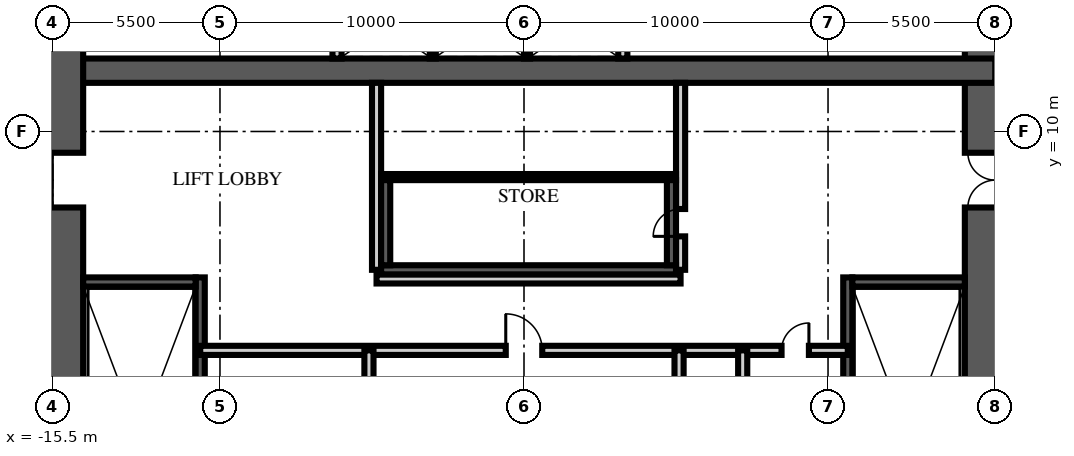
"""IFC4 building model, lengths in metres.
Left out: names, types, materials, properties, quantities, classifications, styles, units other than length and angle.
Written with IfcOpenShell. Run it as: python <this file> out.ifc"""

import sys

from ifc_helpers import new_model, si_unit, direction, frame, frame_2d, origin, place, context, subcontext, project, spatial, rectangle, extrude, element, fill, save


model = new_model("IFC4")
c1 = context("Model", 3, precision=1e-05, world=origin(), true_north=direction((0.0, 1.0)))
c2 = subcontext(c1, "Body", "Model", "MODEL_VIEW")
j1 = project(units=[si_unit("LENGTHUNIT", "METRE"), si_unit("PLANEANGLEUNIT", "RADIAN")], contexts=[c1])
p1 = place(None, origin())
s1 = spatial("IfcSite", under=j1, at=p1, CompositionType="ELEMENT")
p2 = place(p1, origin())
s2 = spatial("IfcBuilding", under=s1, at=p2, CompositionType="ELEMENT")
p3 = place(p2, frame((0.0, 0.0, -5.4)))
s3 = spatial("IfcBuildingStorey", under=s2, at=p3, CompositionType="ELEMENT", Elevation=-5.4)
p4 = place(p3, frame((15.5, -15.5, -0.3), z_axis=(0.0, 0.0, 1.0), x_axis=(0.0, 1.0, 0.0)))
e1 = element("IfcWall", 1, at=p4, inside=s3, PredefinedType="SHEAR", context=c2, shape_type="SweptSolid", body=[
    extrude(rectangle(XDim=31.0, YDim=2.0, at=frame_2d((15.5, 0.0))), origin(), (0.0, 0.0, 1.0), 5.4),
])
p5 = place(p4, frame((6.5, 0.0, 0.3)))
e2 = element("IfcOpeningElement", 2, at=p5, cuts=e1, PredefinedType="OPENING", context=c2, shape_type="SweptSolid", body=[
    extrude(rectangle(XDim=1.2, YDim=2.1, at=frame_2d((0.6, 1.05))), frame((0.0, 1.01, 0.0), z_axis=(0.0, -1.0, 0.0), x_axis=(1.0, 0.0, 0.0)), (0.0, 0.0, 1.0), 2.02),
])
p6 = place(p4, frame((23.0, 0.0, 0.3)))
e3 = element("IfcOpeningElement", 3, at=p6, cuts=e1, PredefinedType="OPENING", context=c2, shape_type="SweptSolid", body=[
    extrude(rectangle(XDim=1.8, YDim=2.1, at=frame_2d((0.9, 1.05))), frame((0.0, 1.01, 0.0), z_axis=(0.0, -1.0, 0.0), x_axis=(1.0, 0.0, 0.0)), (0.0, 0.0, 1.0), 2.02),
])
p7 = place(p3, frame((-15.5, 12.0, -0.3), z_axis=(0.0, 0.0, 1.0), x_axis=(1.0, 0.0, 0.0)))
e4 = element("IfcWall", 4, at=p7, inside=s3, PredefinedType="SHEAR", context=c2, shape_type="SweptSolid", body=[
    extrude(rectangle(XDim=31.0, YDim=0.8, at=frame_2d((15.5, 0.0))), origin(), (0.0, 0.0, 1.0), 5.4),
])
p8 = place(p3, frame((-15.5, -15.5, -0.3), z_axis=(0.0, 0.0, 1.0), x_axis=(0.0, 1.0, 0.0)))
e5 = element("IfcWall", 5, at=p8, inside=s3, PredefinedType="SHEAR", context=c2, shape_type="SweptSolid", body=[
    extrude(rectangle(XDim=31.0, YDim=2.0, at=frame_2d((15.5, 0.0))), origin(), (0.0, 0.0, 1.0), 5.4),
])
p9 = place(p8, frame((6.5, 0.0, 0.3)))
e6 = element("IfcOpeningElement", 6, at=p9, cuts=e5, PredefinedType="OPENING", context=c2, shape_type="SweptSolid", body=[
    extrude(rectangle(XDim=1.2, YDim=2.1, at=frame_2d((0.6, 1.05))), frame((0.0, 1.01, 0.0), z_axis=(0.0, -1.0, 0.0), x_axis=(1.0, 0.0, 0.0)), (0.0, 0.0, 1.0), 2.02),
])
p10 = place(p8, frame((23.0, 0.0, 0.3)))
e7 = element("IfcOpeningElement", 7, at=p10, cuts=e5, PredefinedType="OPENING", context=c2, shape_type="SweptSolid", body=[
    extrude(rectangle(XDim=1.8, YDim=2.1, at=frame_2d((0.9, 1.05))), frame((0.0, 1.01, 0.0), z_axis=(0.0, -1.0, 0.0), x_axis=(1.0, 0.0, 0.0)), (0.0, 0.0, 1.0), 2.02),
])
p11 = place(p3, frame((-10.65, -4.9, 0.0), z_axis=(0.0, 0.0, 1.0), x_axis=(0.0, 1.0, 0.0)))
e8 = element("IfcWall", 8, at=p11, inside=s3, PredefinedType="SOLIDWALL", context=c2, shape_type="SweptSolid", body=[
    extrude(rectangle(XDim=10.1, YDim=0.3, at=frame_2d((5.05, 0.0))), origin(), (0.0, 0.0, 1.0), 5.1),
])
p12 = place(p3, frame((-14.5, 5.05, 0.0), z_axis=(0.0, 0.0, 1.0), x_axis=(1.0, 0.0, 0.0)))
e9 = element("IfcWall", 9, at=p12, inside=s3, PredefinedType="SOLIDWALL", context=c2, shape_type="SweptSolid", body=[
    extrude(rectangle(XDim=3.7, YDim=0.3, at=frame_2d((1.85, 0.0))), origin(), (0.0, 0.0, 1.0), 5.1),
])
p13 = place(p3, frame((10.65, -4.9, 0.0), z_axis=(0.0, 0.0, 1.0), x_axis=(0.0, 1.0, 0.0)))
e10 = element("IfcWall", 10, at=p13, inside=s3, PredefinedType="SOLIDWALL", context=c2, shape_type="SweptSolid", body=[
    extrude(rectangle(XDim=10.1, YDim=0.3, at=frame_2d((5.05, 0.0))), origin(), (0.0, 0.0, 1.0), 5.1),
])
p14 = place(p3, frame((14.5, 5.05, 0.0), z_axis=(0.0, 0.0, 1.0), x_axis=(-1.0, 0.0, 0.0)))
e11 = element("IfcWall", 11, at=p14, inside=s3, PredefinedType="SOLIDWALL", context=c2, shape_type="SweptSolid", body=[
    extrude(rectangle(XDim=3.7, YDim=0.3, at=frame_2d((1.85, 0.0))), origin(), (0.0, 0.0, 1.0), 5.1),
])
for number, where, z_axis, x_axis in (
    (12, (-6.15, 12.4, 0.0), (0.0, 0.0, 1.0), (0.0, 1.0, 0.0)),
    (13, (3.25, 12.4, 0.0), (0.0, 0.0, 1.0), (0.0, 1.0, 0.0)),
):
    element("IfcWall", number, at=place(p3, frame(where, z_axis=z_axis, x_axis=x_axis)), inside=s3, PredefinedType="PARTITIONING", context=c2, shape_type="SweptSolid", body=[
        extrude(rectangle(XDim=2.1, YDim=0.3, at=frame_2d((1.05, 0.0))), origin(), (0.0, 0.0, 1.0), 4.8),
    ])
for number, where, z_axis, x_axis in (
    (14, (-3.0, 12.4, 0.0), (0.0, 0.0, 1.0), (0.0, 1.0, 0.0)),
    (15, (0.1, 12.4, 0.0), (0.0, 0.0, 1.0), (0.0, 1.0, 0.0)),
):
    element("IfcWall", number, at=place(p3, frame(where, z_axis=z_axis, x_axis=x_axis)), inside=s3, PredefinedType="PARTITIONING", context=c2, shape_type="SweptSolid", body=[
        extrude(rectangle(XDim=2.1, YDim=0.2, at=frame_2d((1.05, 0.0))), origin(), (0.0, 0.0, 1.0), 4.8),
    ])
p15 = place(p3, frame((-10.65, 2.8, 0.0), z_axis=(0.0, 0.0, 1.0), x_axis=(1.0, 0.0, 0.0)))
e16 = element("IfcWall", 16, at=p15, inside=s3, PredefinedType="PARTITIONING", context=c2, shape_type="SweptSolid", body=[
    extrude(rectangle(XDim=21.3, YDim=0.3, at=frame_2d((10.65, 0.0))), origin(), (0.0, 0.0, 1.0), 4.8),
])
p16 = place(p15, frame((10.05, 0.0, 0.0)))
e17 = element("IfcOpeningElement", 17, at=p16, cuts=e16, PredefinedType="OPENING", context=c2, shape_type="SweptSolid", body=[
    extrude(rectangle(XDim=1.2, YDim=2.1, at=frame_2d((0.6, 1.05))), frame((0.0, 0.16, 0.0), z_axis=(0.0, -1.0, 0.0), x_axis=(1.0, 0.0, 0.0)), (0.0, 0.0, 1.0), 0.32),
])
p17 = place(p15, frame((19.121, 0.0, 0.0)))
e18 = element("IfcOpeningElement", 18, at=p17, cuts=e16, PredefinedType="OPENING", context=c2, shape_type="SweptSolid", body=[
    extrude(rectangle(XDim=0.9, YDim=2.1, at=frame_2d((0.45, 1.05))), frame((0.0, 0.16, 0.0), z_axis=(0.0, -1.0, 0.0), x_axis=(1.0, 0.0, 0.0)), (0.0, 0.0, 1.0), 0.32),
])
p18 = place(p3, frame((-5.1, -6.65, 0.0), z_axis=(0.0, 0.0, 1.0), x_axis=(0.0, 1.0, 0.0)))
e19 = element("IfcWall", 19, at=p18, inside=s3, PredefinedType="PARTITIONING", context=c2, shape_type="SweptSolid", body=[
    extrude(rectangle(XDim=9.45, YDim=0.3, at=frame_2d((4.725, 0.0))), origin(), (0.0, 0.0, 1.0), 4.8),
])
p19 = place(p18, frame((2.648, 0.0, 0.0)))
e20 = element("IfcOpeningElement", 20, at=p19, cuts=e19, PredefinedType="OPENING", context=c2, shape_type="SweptSolid", body=[
    extrude(rectangle(XDim=0.9, YDim=2.1, at=frame_2d((0.45, 1.05))), frame((0.0, 0.16, 0.0), z_axis=(0.0, -1.0, 0.0), x_axis=(1.0, 0.0, 0.0)), (0.0, 0.0, 1.0), 0.32),
])
p20 = place(p18, frame((7.373, 0.0, 0.0)))
e21 = element("IfcOpeningElement", 21, at=p20, cuts=e19, PredefinedType="OPENING", context=c2, shape_type="SweptSolid", body=[
    extrude(rectangle(XDim=0.9, YDim=2.1, at=frame_2d((0.45, 1.05))), frame((0.0, 0.16, 0.0), z_axis=(0.0, -1.0, 0.0), x_axis=(1.0, 0.0, 0.0)), (0.0, 0.0, 1.0), 0.32),
])
p21 = place(p3, frame((5.1, -6.65, 0.0), z_axis=(0.0, 0.0, 1.0), x_axis=(0.0, 1.0, 0.0)))
e22 = element("IfcWall", 22, at=p21, inside=s3, PredefinedType="PARTITIONING", context=c2, shape_type="SweptSolid", body=[
    extrude(rectangle(XDim=9.45, YDim=0.3, at=frame_2d((4.725, 0.0))), origin(), (0.0, 0.0, 1.0), 4.8),
])
p22 = place(p21, frame((4.275, 0.0, 0.0)))
e23 = element("IfcOpeningElement", 23, at=p22, cuts=e22, PredefinedType="OPENING", context=c2, shape_type="SweptSolid", body=[
    extrude(rectangle(XDim=0.9, YDim=2.1, at=frame_2d((0.45, 1.05))), frame((0.0, 0.16, 0.0), z_axis=(0.0, -1.0, 0.0), x_axis=(1.0, 0.0, 0.0)), (0.0, 0.0, 1.0), 0.32),
])
p23 = place(p3, frame((7.193, -6.65, 0.0), z_axis=(0.0, 0.0, 1.0), x_axis=(0.0, 1.0, 0.0)))
e24 = element("IfcWall", 24, at=p23, inside=s3, PredefinedType="PARTITIONING", context=c2, shape_type="SweptSolid", body=[
    extrude(rectangle(XDim=9.45, YDim=0.3, at=frame_2d((4.725, 0.0))), origin(), (0.0, 0.0, 1.0), 4.8),
])
p24 = place(p3, frame((-4.85, 5.15, 0.0), z_axis=(0.0, 0.0, 1.0), x_axis=(1.0, 0.0, 0.0)))
e25 = element("IfcWall", 25, at=p24, inside=s3, PredefinedType="PARTITIONING", context=c2, shape_type="SweptSolid", body=[
    extrude(rectangle(XDim=10.0, YDim=0.3, at=frame_2d((5.0, 0.0))), origin(), (0.0, 0.0, 1.0), 4.8),
])
p25 = place(p3, frame((-4.85, 5.45, 0.0), z_axis=(0.0, 0.0, 1.0), x_axis=(0.0, 1.0, 0.0)))
e26 = element("IfcWall", 26, at=p25, inside=s3, PredefinedType="PARTITIONING", context=c2, shape_type="SweptSolid", body=[
    extrude(rectangle(XDim=6.15, YDim=0.3, at=frame_2d((3.075, 0.0))), origin(), (0.0, 0.0, 1.0), 4.8),
])
p26 = place(p3, frame((5.15, 5.45, 0.0), z_axis=(0.0, 0.0, 1.0), x_axis=(0.0, 1.0, 0.0)))
e27 = element("IfcWall", 27, at=p26, inside=s3, PredefinedType="PARTITIONING", context=c2, shape_type="SweptSolid", body=[
    extrude(rectangle(XDim=6.15, YDim=0.3, at=frame_2d((3.075, 0.0))), origin(), (0.0, 0.0, 1.0), 4.8),
])
p27 = place(p26, frame((1.1, 0.0, 0.0)))
e28 = element("IfcOpeningElement", 28, at=p27, cuts=e27, PredefinedType="OPENING", context=c2, shape_type="SweptSolid", body=[
    extrude(rectangle(XDim=0.9, YDim=2.1, at=frame_2d((0.45, 1.05))), frame((0.0, 0.16, 0.0), z_axis=(0.0, -1.0, 0.0), x_axis=(1.0, 0.0, 0.0)), (0.0, 0.0, 1.0), 0.32),
])
p28 = place(p3, frame((-4.7, 5.45, 3.3), z_axis=(0.0, 0.0, 1.0), x_axis=(1.0, 0.0, 0.0)))
e29 = element("IfcWall", 29, at=p28, inside=s3, PredefinedType="SOLIDWALL", context=c2, shape_type="SweptSolid", body=[
    extrude(rectangle(XDim=9.7, YDim=0.3, at=frame_2d((4.85, 0.0))), origin(), (0.0, 0.0, 1.0), 1.8),
])
p29 = place(p3, frame((-4.7, 8.5, 3.3), z_axis=(0.0, 0.0, 1.0), x_axis=(1.0, 0.0, 0.0)))
e30 = element("IfcWall", 30, at=p29, inside=s3, PredefinedType="SOLIDWALL", context=c2, shape_type="SweptSolid", body=[
    extrude(rectangle(XDim=9.7, YDim=0.2, at=frame_2d((4.85, 0.0))), origin(), (0.0, 0.0, 1.0), 1.8),
])
for number, where, z_axis, x_axis in (
    (31, (-4.55, 5.6, 3.3), (0.0, 0.0, 1.0), (0.0, 1.0, 0.0)),
    (32, (4.85, 5.6, 3.3), (0.0, 0.0, 1.0), (0.0, 1.0, 0.0)),
):
    element("IfcWall", number, at=place(p3, frame(where, z_axis=z_axis, x_axis=x_axis)), inside=s3, PredefinedType="SOLIDWALL", context=c2, shape_type="SweptSolid", body=[
        extrude(rectangle(XDim=2.8, YDim=0.3, at=frame_2d((1.4, 0.0))), origin(), (0.0, 0.0, 1.0), 1.8),
    ])
p30 = place(p10, origin())
e33 = element("IfcDoor", 33, at=p30, inside=s3, OperationType="DOUBLE_DOOR_SINGLE_SWING", PredefinedType="DOOR", context=c2, shape_type="SweptSolid", body=[
    extrude(rectangle(XDim=1.8, YDim=2.1, at=frame_2d((0.9, 1.05))), frame((0.0, 0.025, 0.0), z_axis=(0.0, -1.0, 0.0), x_axis=(1.0, 0.0, 0.0)), (0.0, 0.0, 1.0), 0.05),
])
fill(e7, e33)
p31 = place(p6, origin())
e34 = element("IfcDoor", 34, at=p31, inside=s3, OperationType="DOUBLE_DOOR_SINGLE_SWING", PredefinedType="DOOR", context=c2, shape_type="SweptSolid", body=[
    extrude(rectangle(XDim=1.8, YDim=2.1, at=frame_2d((0.9, 1.05))), frame((0.0, 0.025, 0.0), z_axis=(0.0, -1.0, 0.0), x_axis=(1.0, 0.0, 0.0)), (0.0, 0.0, 1.0), 0.05),
])
fill(e3, e34)
p32 = place(p16, origin())
e35 = element("IfcDoor", 35, at=p32, inside=s3, OperationType="SINGLE_SWING_LEFT", PredefinedType="DOOR", context=c2, shape_type="SweptSolid", body=[
    extrude(rectangle(XDim=1.2, YDim=2.1, at=frame_2d((0.6, 1.05))), frame((0.0, 0.025, 0.0), z_axis=(0.0, -1.0, 0.0), x_axis=(1.0, 0.0, 0.0)), (0.0, 0.0, 1.0), 0.05),
])
fill(e17, e35)
p33 = place(p17, origin())
e36 = element("IfcDoor", 36, at=p33, inside=s3, OperationType="SINGLE_SWING_RIGHT", PredefinedType="DOOR", context=c2, shape_type="SweptSolid", body=[
    extrude(rectangle(XDim=0.9, YDim=2.1, at=frame_2d((0.45, 1.05))), frame((0.0, 0.025, 0.0), z_axis=(0.0, -1.0, 0.0), x_axis=(1.0, 0.0, 0.0)), (0.0, 0.0, 1.0), 0.05),
])
fill(e18, e36)
p34 = place(p27, origin())
e37 = element("IfcDoor", 37, at=p34, inside=s3, OperationType="SINGLE_SWING_LEFT", PredefinedType="DOOR", context=c2, shape_type="SweptSolid", body=[
    extrude(rectangle(XDim=0.9, YDim=2.1, at=frame_2d((0.45, 1.05))), frame((0.0, 0.025, 0.0), z_axis=(0.0, -1.0, 0.0), x_axis=(1.0, 0.0, 0.0)), (0.0, 0.0, 1.0), 0.05),
])
fill(e28, e37)
save(model, sys.argv[1])
